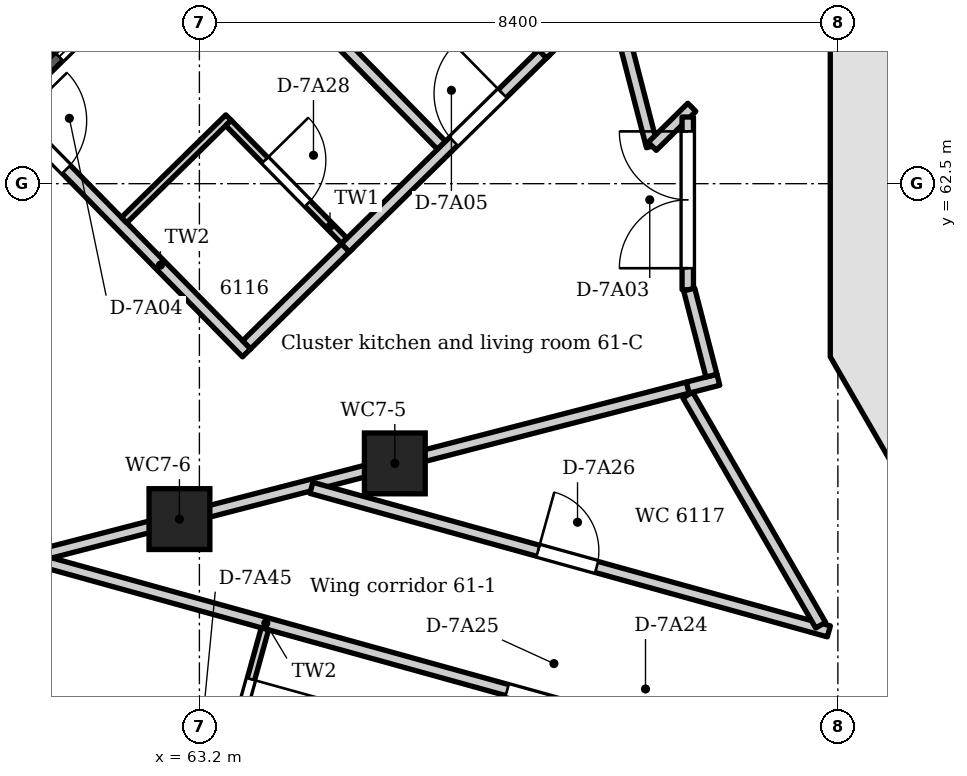
"""IFC4 building model, lengths in metres.
Left out: names, types, materials, properties, quantities, classifications, styles, units other than length and angle.
Written with IfcOpenShell. Run it as: python <this file> out.ifc"""

import sys

from ifc_helpers import new_model, si_unit, direction, frame, frame_2d, origin, origin_2d, place, context, subcontext, project, spatial, polyline, rectangle, circle, outline, extrude, element, fill, save


model = new_model("IFC4")
c1 = context("Model", 3, precision=1e-05, world=origin(), true_north=direction((0.0, 1.0)))
c2 = subcontext(c1, "Body", "Model", "MODEL_VIEW")
j1 = project(units=[si_unit("LENGTHUNIT", "METRE"), si_unit("PLANEANGLEUNIT", "RADIAN")], contexts=[c1])
p1 = place(None, origin())
s1 = spatial("IfcSite", under=j1, at=p1, CompositionType="ELEMENT")
p2 = place(p1, origin())
s2 = spatial("IfcBuilding", under=s1, at=p2, CompositionType="ELEMENT")
p3 = place(p2, frame((0.0, 0.0, 234.9)))
s3 = spatial("IfcBuildingStorey", under=s2, at=p3, CompositionType="ELEMENT", Elevation=234.9)
p4 = place(p3, frame((71.85, 64.778, 0.0), z_axis=(0.0, 0.0, 1.0), x_axis=(0.0, -1.0, 0.0)))
e1 = element("IfcWall", 1, at=p4, inside=s3, PredefinedType="SHEAR", context=c2, shape_type="SweptSolid", body=[
    extrude(outline(polyline([(0.0, -0.35), (4.555, -0.35), (4.368, 0.35), (0.188, 0.35), (0.0, -0.35)])), origin(), (0.0, 0.0, 1.0), 3.6),
])
p5 = place(p4, frame((2.992, 0.0, 0.0)))
e2 = element("IfcOpeningElement", 2, at=p5, cuts=e1, PredefinedType="OPENING", context=c2, shape_type="SweptSolid", body=[
    extrude(rectangle(XDim=0.9, YDim=2.1, at=frame_2d((0.45, 1.05))), frame((0.0, 0.36, 0.0), z_axis=(0.0, -1.0, 0.0), x_axis=(1.0, 0.0, 0.0)), (0.0, 0.0, 1.0), 0.72),
])
p6 = place(p3, frame((71.803, 60.397, 0.0), z_axis=(0.0, 0.0, 1.0), x_axis=(0.499983800959, -0.866034756103, 0.0)))
e3 = element("IfcWall", 3, at=p6, inside=s3, PredefinedType="SHEAR", context=c2, shape_type="SweptSolid", body=[
    extrude(outline(polyline([(0.0, -0.35), (4.555, -0.35), (4.368, 0.35), (0.188, 0.35), (0.0, -0.35)])), origin(), (0.0, 0.0, 1.0), 3.6),
])
p7 = place(p6, frame((1.577, 0.0, 0.0)))
e4 = element("IfcOpeningElement", 4, at=p7, cuts=e3, PredefinedType="OPENING", context=c2, shape_type="SweptSolid", body=[
    extrude(rectangle(XDim=1.4, YDim=2.1, at=frame_2d((0.7, 1.05))), frame((0.0, 0.36, 0.0), z_axis=(0.0, -1.0, 0.0), x_axis=(1.0, 0.0, 0.0)), (0.0, 0.0, 1.0), 0.72),
])
for number, where, z_axis, x_axis in (
    (5, (65.771, 58.82, -0.35), (0.0, 0.0, 1.0), (1.0, 0.0, 0.0)),
    (6, (62.938, 58.087, -0.35), (0.0, 0.0, 1.0), (1.0, 0.0, 0.0)),
):
    element("IfcColumn", number, at=place(p3, frame(where, z_axis=z_axis, x_axis=x_axis)), inside=s3, PredefinedType="COLUMN", context=c2, shape_type="SweptSolid", body=[
        extrude(circle(Radius=0.4, at=origin_2d()), origin(), (0.0, 0.0, 1.0), 3.95),
    ])
p8 = place(p3, frame((57.99, 60.867, 0.0), z_axis=(0.0, 0.0, 1.0), x_axis=(0.713254682671, 0.700904956216, 0.0)))
e7 = element("IfcWall", 7, at=p8, inside=s3, PredefinedType="SOLIDWALL", context=c2, shape_type="SweptSolid", body=[
    extrude(outline(polyline([(0.149, 0.075), (0.149, -0.075), (33.537, -0.075), (33.537, 0.075), (0.149, 0.075)])), origin(), (0.0, 0.0, 1.0), 3.3),
])
p9 = place(p8, frame((1.171, 0.0, 0.0)))
e8 = element("IfcOpeningElement", 8, at=p9, cuts=e7, PredefinedType="OPENING", context=c2, shape_type="SweptSolid", body=[
    extrude(rectangle(XDim=1.8, YDim=2.6, at=frame_2d((0.9, 1.3))), frame((0.0, 0.085, 0.0), z_axis=(0.0, -1.0, 0.0), x_axis=(1.0, 0.0, 0.0)), (0.0, 0.0, 1.0), 0.17),
])
p10 = place(p8, frame((4.714, 0.0, 0.0)))
e9 = element("IfcOpeningElement", 9, at=p10, cuts=e7, PredefinedType="OPENING", context=c2, shape_type="SweptSolid", body=[
    extrude(rectangle(XDim=1.8, YDim=2.6, at=frame_2d((0.9, 1.3))), frame((0.0, 0.085, 0.0), z_axis=(0.0, -1.0, 0.0), x_axis=(1.0, 0.0, 0.0)), (0.0, 0.0, 1.0), 0.17),
])
p11 = place(p8, frame((8.457, 0.0, 0.0)))
e10 = element("IfcOpeningElement", 10, at=p11, cuts=e7, PredefinedType="OPENING", context=c2, shape_type="SweptSolid", body=[
    extrude(rectangle(XDim=1.8, YDim=2.6, at=frame_2d((0.9, 1.3))), frame((0.0, 0.085, 0.0), z_axis=(0.0, -1.0, 0.0), x_axis=(1.0, 0.0, 0.0)), (0.0, 0.0, 1.0), 0.17),
])
p12 = place(p8, frame((12.2, 0.0, 0.0)))
e11 = element("IfcOpeningElement", 11, at=p12, cuts=e7, PredefinedType="OPENING", context=c2, shape_type="SweptSolid", body=[
    extrude(rectangle(XDim=1.8, YDim=2.6, at=frame_2d((0.9, 1.3))), frame((0.0, 0.085, 0.0), z_axis=(0.0, -1.0, 0.0), x_axis=(1.0, 0.0, 0.0)), (0.0, 0.0, 1.0), 0.17),
])
p13 = place(p8, frame((15.943, 0.0, 0.0)))
e12 = element("IfcOpeningElement", 12, at=p13, cuts=e7, PredefinedType="OPENING", context=c2, shape_type="SweptSolid", body=[
    extrude(rectangle(XDim=1.8, YDim=2.6, at=frame_2d((0.9, 1.3))), frame((0.0, 0.085, 0.0), z_axis=(0.0, -1.0, 0.0), x_axis=(1.0, 0.0, 0.0)), (0.0, 0.0, 1.0), 0.17),
])
p14 = place(p8, frame((19.686, 0.0, 0.0)))
e13 = element("IfcOpeningElement", 13, at=p14, cuts=e7, PredefinedType="OPENING", context=c2, shape_type="SweptSolid", body=[
    extrude(rectangle(XDim=1.8, YDim=2.6, at=frame_2d((0.9, 1.3))), frame((0.0, 0.085, 0.0), z_axis=(0.0, -1.0, 0.0), x_axis=(1.0, 0.0, 0.0)), (0.0, 0.0, 1.0), 0.17),
])
p15 = place(p8, frame((23.429, 0.0, 0.0)))
e14 = element("IfcOpeningElement", 14, at=p15, cuts=e7, PredefinedType="OPENING", context=c2, shape_type="SweptSolid", body=[
    extrude(rectangle(XDim=1.8, YDim=2.6, at=frame_2d((0.9, 1.3))), frame((0.0, 0.085, 0.0), z_axis=(0.0, -1.0, 0.0), x_axis=(1.0, 0.0, 0.0)), (0.0, 0.0, 1.0), 0.17),
])
p16 = place(p8, frame((27.172, 0.0, 0.0)))
e15 = element("IfcOpeningElement", 15, at=p16, cuts=e7, PredefinedType="OPENING", context=c2, shape_type="SweptSolid", body=[
    extrude(rectangle(XDim=1.8, YDim=2.6, at=frame_2d((0.9, 1.3))), frame((0.0, 0.085, 0.0), z_axis=(0.0, -1.0, 0.0), x_axis=(1.0, 0.0, 0.0)), (0.0, 0.0, 1.0), 0.17),
])
p17 = place(p8, frame((30.715, 0.0, 0.0)))
e16 = element("IfcOpeningElement", 16, at=p17, cuts=e7, PredefinedType="OPENING", context=c2, shape_type="SweptSolid", body=[
    extrude(rectangle(XDim=1.8, YDim=2.6, at=frame_2d((0.9, 1.3))), frame((0.0, 0.085, 0.0), z_axis=(0.0, -1.0, 0.0), x_axis=(1.0, 0.0, 0.0)), (0.0, 0.0, 1.0), 0.17),
])
p18 = place(p3, origin())
e17 = element("IfcWall", 17, at=p18, inside=s3, PredefinedType="PARAPET", context=c2, shape_type="SweptSolid", body=[
    extrude(outline(polyline([(80.313, 86.12), (49.243, 61.406), (49.565, 61.279), (78.266, 84.108), (80.313, 86.12)])), origin(), (0.0, 0.0, 1.0), 1.1),
])
p19 = place(p3, frame((60.712, 63.438, 0.0), z_axis=(0.0, 0.0, 1.0), x_axis=(0.700942148678, -0.713218132276, 0.0)))
e18 = element("IfcWall", 18, at=p19, inside=s3, PredefinedType="PARTITIONING", context=c2, shape_type="SweptSolid", body=[
    extrude(rectangle(XDim=4.435, YDim=0.15, at=frame_2d((2.218, 0.0))), origin(), (0.0, 0.0, 1.0), 3.3),
])
p20 = place(p19, frame((0.15, 0.0, 0.0)))
e19 = element("IfcOpeningElement", 19, at=p20, cuts=e18, PredefinedType="OPENING", context=c2, shape_type="SweptSolid", body=[
    extrude(rectangle(XDim=0.9, YDim=2.1, at=frame_2d((0.45, 1.05))), frame((0.0, 0.085, 0.0), z_axis=(0.0, -1.0, 0.0), x_axis=(1.0, 0.0, 0.0)), (0.0, 0.0, 1.0), 0.17),
])
p21 = place(p3, frame((60.898, 57.56, 0.0), z_axis=(0.0, 0.0, 1.0), x_axis=(0.968148722019, 0.250375821623, 0.0)))
e20 = element("IfcWall", 20, at=p21, inside=s3, PredefinedType="PARTITIONING", context=c2, shape_type="SweptSolid", body=[
    extrude(rectangle(XDim=9.018, YDim=0.15, at=frame_2d((4.509, 0.0))), origin(), (0.0, 0.0, 1.0), 2.75),
])
p22 = place(p3, frame((61.043, 57.559, 0.0), z_axis=(0.0, 0.0, 1.0), x_axis=(0.963630739332, -0.26723734435, 0.0)))
e21 = element("IfcWall", 21, at=p22, inside=s3, PredefinedType="PARTITIONING", context=c2, shape_type="SweptSolid", body=[
    extrude(rectangle(XDim=12.979, YDim=0.15, at=frame_2d((6.49, 0.0))), origin(), (0.0, 0.0, 1.0), 2.75),
])
p23 = place(p22, frame((7.74, 0.0, 0.0)))
e22 = element("IfcOpeningElement", 22, at=p23, cuts=e21, PredefinedType="OPENING", context=c2, shape_type="SweptSolid", body=[
    extrude(rectangle(XDim=0.9, YDim=2.1, at=frame_2d((0.45, 1.05))), frame((0.0, 0.085, 0.0), z_axis=(0.0, -1.0, 0.0), x_axis=(1.0, 0.0, 0.0)), (0.0, 0.0, 1.0), 0.17),
])
p24 = place(p22, frame((6.44, 0.0, 0.0)))
e23 = element("IfcOpeningElement", 23, at=p24, cuts=e21, PredefinedType="OPENING", context=c2, shape_type="SweptSolid", body=[
    extrude(rectangle(XDim=1.0, YDim=2.1, at=frame_2d((0.5, 1.05))), frame((0.0, 0.085, 0.0), z_axis=(0.0, -1.0, 0.0), x_axis=(1.0, 0.0, 0.0)), (0.0, 0.0, 1.0), 0.17),
])
p25 = place(p3, frame((62.209, 62.021, 0.0), z_axis=(0.0, 0.0, 1.0), x_axis=(0.713229664058, 0.70093041474, 0.0)))
e24 = element("IfcWall", 24, at=p25, inside=s3, PredefinedType="PARTITIONING", context=c2, shape_type="SweptSolid", body=[
    extrude(rectangle(XDim=1.926, YDim=0.1, at=frame_2d((0.963, 0.0))), origin(), (0.0, 0.0, 1.0), 3.3),
])
p26 = place(p3, frame((63.382, 66.061, 0.0), z_axis=(0.0, 0.0, 1.0), x_axis=(0.70092652961, -0.71323348217, 0.0)))
e25 = element("IfcWall", 25, at=p26, inside=s3, PredefinedType="PARTITIONING", context=c2, shape_type="SweptSolid", body=[
    extrude(rectangle(XDim=4.285, YDim=0.15, at=frame_2d((2.143, 0.0))), origin(), (0.0, 0.0, 1.0), 3.3),
])
p27 = place(p3, frame((63.427, 54.355, 0.0), z_axis=(0.0, 0.0, 1.0), x_axis=(0.267177255804, 0.963647401273, 0.0)))
e26 = element("IfcWall", 26, at=p27, inside=s3, PredefinedType="PARTITIONING", context=c2, shape_type="SweptSolid", body=[
    extrude(rectangle(XDim=2.375, YDim=0.1, at=frame_2d((1.188, 0.0))), origin(), (0.0, 0.0, 1.0), 3.3),
])
p28 = place(p27, frame((0.688, 0.0, 0.0)))
e27 = element("IfcOpeningElement", 27, at=p28, cuts=e26, PredefinedType="OPENING", context=c2, shape_type="SweptSolid", body=[
    extrude(rectangle(XDim=1.0, YDim=2.1, at=frame_2d((0.5, 1.05))), frame((0.0, 0.06, 0.0), z_axis=(0.0, -1.0, 0.0), x_axis=(1.0, 0.0, 0.0)), (0.0, 0.0, 1.0), 0.12),
])
p29 = place(p3, frame((63.582, 63.299, 0.0), z_axis=(0.0, 0.0, 1.0), x_axis=(0.700793702446, -0.713363993073, 0.0)))
e28 = element("IfcWall", 28, at=p29, inside=s3, PredefinedType="PARTITIONING", context=c2, shape_type="SweptSolid", body=[
    extrude(rectangle(XDim=2.175, YDim=0.1, at=frame_2d((1.088, 0.0))), origin(), (0.0, 0.0, 1.0), 3.3),
])
p30 = place(p29, frame((0.688, 0.0, 0.0)))
e29 = element("IfcOpeningElement", 29, at=p30, cuts=e28, PredefinedType="OPENING", context=c2, shape_type="SweptSolid", body=[
    extrude(rectangle(XDim=0.8, YDim=2.1, at=frame_2d((0.4, 1.05))), frame((0.0, 0.06, 0.0), z_axis=(0.0, -1.0, 0.0), x_axis=(1.0, 0.0, 0.0)), (0.0, 0.0, 1.0), 0.12),
])
p31 = place(p3, frame((63.822, 60.381, 0.0), z_axis=(0.0, 0.0, 1.0), x_axis=(0.713509638131, 0.700645414096, 0.0)))
e30 = element("IfcWall", 30, at=p31, inside=s3, PredefinedType="PARTITIONING", context=c2, shape_type="SweptSolid", body=[
    extrude(rectangle(XDim=1.879, YDim=0.15, at=frame_2d((0.939, 0.0))), origin(), (0.0, 0.0, 1.0), 3.3),
])
p32 = place(p3, frame((64.673, 58.498, 0.0), z_axis=(0.0, 0.0, 1.0), x_axis=(0.963632187737, -0.267232121491, 0.0)))
e31 = element("IfcWall", 31, at=p32, inside=s3, PredefinedType="PARTITIONING", context=c2, shape_type="SweptSolid", body=[
    extrude(rectangle(XDim=7.065, YDim=0.15, at=frame_2d((3.532, 0.0))), origin(), (0.0, 0.0, 1.0), 2.8),
])
p33 = place(p32, frame((3.095, 0.0, 0.0)))
e32 = element("IfcOpeningElement", 32, at=p33, cuts=e31, PredefinedType="OPENING", context=c2, shape_type="SweptSolid", body=[
    extrude(rectangle(XDim=0.8, YDim=2.1, at=frame_2d((0.4, 1.05))), frame((0.0, 0.085, 0.0), z_axis=(0.0, -1.0, 0.0), x_axis=(1.0, 0.0, 0.0)), (0.0, 0.0, 1.0), 0.17),
])
p34 = place(p3, frame((65.12, 61.656, 0.0), z_axis=(0.0, 0.0, 1.0), x_axis=(0.713194386998, 0.700966309001, 0.0)))
e33 = element("IfcWall", 33, at=p34, inside=s3, PredefinedType="PARTITIONING", context=c2, shape_type="SweptSolid", body=[
    extrude(rectangle(XDim=3.694, YDim=0.15, at=frame_2d((1.847, 0.0))), origin(), (0.0, 0.0, 1.0), 3.3),
])
p35 = place(p34, frame((1.998, 0.0, 0.0)))
e34 = element("IfcOpeningElement", 34, at=p35, cuts=e33, PredefinedType="OPENING", context=c2, shape_type="SweptSolid", body=[
    extrude(rectangle(XDim=0.9, YDim=2.1, at=frame_2d((0.45, 1.05))), frame((0.0, 0.085, 0.0), z_axis=(0.0, -1.0, 0.0), x_axis=(1.0, 0.0, 0.0)), (0.0, 0.0, 1.0), 0.17),
])
p36 = place(p3, frame((66.139, 65.812, 0.0), z_axis=(0.0, 0.0, 1.0), x_axis=(0.701018173636, -0.713143407901, 0.0)))
e35 = element("IfcWall", 35, at=p36, inside=s3, PredefinedType="PARTITIONING", context=c2, shape_type="SweptSolid", body=[
    extrude(rectangle(XDim=2.175, YDim=0.1, at=frame_2d((1.087, 0.0))), origin(), (0.0, 0.0, 1.0), 3.3),
])
p37 = place(p36, frame((0.687, 0.0, 0.0)))
e36 = element("IfcOpeningElement", 36, at=p37, cuts=e35, PredefinedType="OPENING", context=c2, shape_type="SweptSolid", body=[
    extrude(rectangle(XDim=0.8, YDim=2.1, at=frame_2d((0.4, 1.05))), frame((0.0, 0.06, 0.0), z_axis=(0.0, -1.0, 0.0), x_axis=(1.0, 0.0, 0.0)), (0.0, 0.0, 1.0), 0.12),
])
p38 = place(p3, frame((67.714, 64.205, 0.0), z_axis=(0.0, 0.0, 1.0), x_axis=(0.712981774693, 0.70118256464, 0.0)))
e37 = element("IfcWall", 37, at=p38, inside=s3, PredefinedType="PARTITIONING", context=c2, shape_type="SweptSolid", body=[
    extrude(rectangle(XDim=1.262, YDim=0.15, at=frame_2d((0.631, 0.0))), origin(), (0.0, 0.0, 1.0), 3.3),
])
p39 = place(p3, frame((68.631, 65.016, 0.0), z_axis=(0.0, 0.0, 1.0), x_axis=(0.250220542644, -0.968188865893, 0.0)))
e38 = element("IfcWall", 38, at=p39, inside=s3, PredefinedType="PARTITIONING", context=c2, shape_type="SweptSolid", body=[
    extrude(rectangle(XDim=2.091, YDim=0.15, at=frame_2d((1.045, 0.0))), origin(), (0.0, 0.0, 1.0), 3.3),
])
p40 = place(p3, frame((69.158, 62.992, 0.0), z_axis=(0.0, 0.0, 1.0), x_axis=(0.712433157826, 0.701739977221, 0.0)))
e39 = element("IfcWall", 39, at=p40, inside=s3, PredefinedType="PARTITIONING", context=c2, shape_type="SweptSolid", body=[
    extrude(rectangle(XDim=0.731, YDim=0.15, at=frame_2d((0.365, 0.0))), origin(), (0.0, 0.0, 1.0), 3.3),
])
p41 = place(p3, frame((69.625, 59.72, 0.0), z_axis=(0.0, 0.0, 1.0), x_axis=(0.50005889006, -0.865991400923, 0.0)))
e40 = element("IfcWall", 40, at=p41, inside=s3, PredefinedType="PARTITIONING", context=c2, shape_type="SweptSolid", body=[
    extrude(rectangle(XDim=3.497, YDim=0.15, at=frame_2d((1.748, 0.0))), origin(), (0.0, 0.0, 1.0), 2.8),
])
p42 = place(p3, frame((69.625, 59.817, 0.0), z_axis=(0.0, 0.0, 1.0), x_axis=(0.968355193071, 0.249576080688, 0.0)))
e41 = element("IfcWall", 41, at=p42, inside=s3, PredefinedType="PARTITIONING", context=c2, shape_type="SweptSolid", body=[
    extrude(rectangle(XDim=0.416, YDim=0.15, at=frame_2d((0.208, 0.0))), origin(), (0.0, 0.0, 1.0), 2.8),
])
p43 = place(p3, frame((69.625, 61.105, 0.0), z_axis=(0.0, 0.0, 1.0), x_axis=(0.0, 1.0, 0.0)))
e42 = element("IfcWall", 42, at=p43, inside=s3, PredefinedType="PARTITIONING", context=c2, shape_type="SweptSolid", body=[
    extrude(rectangle(XDim=2.272, YDim=0.15, at=frame_2d((1.136, 0.0))), origin(), (0.0, 0.0, 1.0), 3.3),
])
p44 = place(p43, frame((0.283, 0.0, 0.0)))
e43 = element("IfcOpeningElement", 43, at=p44, cuts=e42, PredefinedType="OPENING", context=c2, shape_type="SweptSolid", body=[
    extrude(rectangle(XDim=1.8, YDim=2.1, at=frame_2d((0.9, 1.05))), frame((0.0, 0.085, 0.0), z_axis=(0.0, -1.0, 0.0), x_axis=(1.0, 0.0, 0.0)), (0.0, 0.0, 1.0), 0.17),
])
p45 = place(p3, frame((69.644, 61.107, 0.0), z_axis=(0.0, 0.0, 1.0), x_axis=(0.249991617467, -0.968248000874, 0.0)))
e44 = element("IfcWall", 44, at=p45, inside=s3, PredefinedType="PARTITIONING", context=c2, shape_type="SweptSolid", body=[
    extrude(rectangle(XDim=1.17, YDim=0.15, at=frame_2d((0.585, 0.0))), origin(), (0.0, 0.0, 1.0), 2.8),
])
p46 = place(p10, origin())
e45 = element("IfcDoor", 45, at=p46, inside=s3, OperationType="SLIDING_TO_LEFT", PredefinedType="DOOR", context=c2, shape_type="SweptSolid", body=[
    extrude(rectangle(XDim=1.8, YDim=2.6, at=frame_2d((0.9, 1.3))), frame((0.0, 0.025, 0.0), z_axis=(0.0, -1.0, 0.0), x_axis=(1.0, 0.0, 0.0)), (0.0, 0.0, 1.0), 0.05),
])
fill(e9, e45)
p47 = place(p44, origin())
e46 = element("IfcDoor", 46, at=p47, inside=s3, OperationType="DOUBLE_DOOR_DOUBLE_SWING", PredefinedType="DOOR", context=c2, shape_type="SweptSolid", body=[
    extrude(rectangle(XDim=1.8, YDim=2.1, at=frame_2d((0.9, 1.05))), frame((0.0, 0.025, 0.0), z_axis=(0.0, -1.0, 0.0), x_axis=(1.0, 0.0, 0.0)), (0.0, 0.0, 1.0), 0.05),
])
fill(e43, e46)
p48 = place(p20, origin())
e47 = element("IfcDoor", 47, at=p48, inside=s3, OperationType="SINGLE_SWING_LEFT", PredefinedType="DOOR", context=c2, shape_type="SweptSolid", body=[
    extrude(rectangle(XDim=0.9, YDim=2.1, at=frame_2d((0.45, 1.05))), frame((0.0, 0.025, 0.0), z_axis=(0.0, -1.0, 0.0), x_axis=(1.0, 0.0, 0.0)), (0.0, 0.0, 1.0), 0.05),
])
fill(e19, e47)
p49 = place(p35, origin())
e48 = element("IfcDoor", 48, at=p49, inside=s3, OperationType="SINGLE_SWING_RIGHT", PredefinedType="DOOR", context=c2, shape_type="SweptSolid", body=[
    extrude(rectangle(XDim=0.9, YDim=2.1, at=frame_2d((0.45, 1.05))), frame((0.0, 0.025, 0.0), z_axis=(0.0, -1.0, 0.0), x_axis=(1.0, 0.0, 0.0)), (0.0, 0.0, 1.0), 0.05),
])
fill(e34, e48)
p50 = place(p24, frame((1.0, 0.0, 0.0), z_axis=(0.0, 0.0, 1.0), x_axis=(-1.0, 0.0, 0.0)))
e49 = element("IfcDoor", 49, at=p50, inside=s3, OperationType="SINGLE_SWING_LEFT", PredefinedType="DOOR", context=c2, shape_type="SweptSolid", body=[
    extrude(rectangle(XDim=1.0, YDim=2.1, at=frame_2d((0.5, 1.05))), frame((0.0, 0.025, 0.0), z_axis=(0.0, -1.0, 0.0), x_axis=(1.0, 0.0, 0.0)), (0.0, 0.0, 1.0), 0.05),
])
fill(e23, e49)
p51 = place(p33, origin())
e50 = element("IfcDoor", 50, at=p51, inside=s3, OperationType="SINGLE_SWING_LEFT", PredefinedType="DOOR", context=c2, shape_type="SweptSolid", body=[
    extrude(rectangle(XDim=0.8, YDim=2.1, at=frame_2d((0.4, 1.05))), frame((0.0, 0.025, 0.0), z_axis=(0.0, -1.0, 0.0), x_axis=(1.0, 0.0, 0.0)), (0.0, 0.0, 1.0), 0.05),
])
fill(e32, e50)
p52 = place(p30, origin())
e51 = element("IfcDoor", 51, at=p52, inside=s3, OperationType="SINGLE_SWING_LEFT", PredefinedType="DOOR", context=c2, shape_type="SweptSolid", body=[
    extrude(rectangle(XDim=0.8, YDim=2.1, at=frame_2d((0.4, 1.05))), frame((0.0, 0.025, 0.0), z_axis=(0.0, -1.0, 0.0), x_axis=(1.0, 0.0, 0.0)), (0.0, 0.0, 1.0), 0.05),
])
fill(e29, e51)
p53 = place(p28, frame((1.0, 0.0, 0.0), z_axis=(0.0, 0.0, 1.0), x_axis=(-1.0, 0.0, 0.0)))
e52 = element("IfcDoor", 52, at=p53, inside=s3, OperationType="SINGLE_SWING_LEFT", PredefinedType="DOOR", context=c2, shape_type="SweptSolid", body=[
    extrude(rectangle(XDim=1.0, YDim=2.1, at=frame_2d((0.5, 1.05))), frame((0.0, 0.025, 0.0), z_axis=(0.0, -1.0, 0.0), x_axis=(1.0, 0.0, 0.0)), (0.0, 0.0, 1.0), 0.05),
])
fill(e27, e52)
p54 = place(p5, origin())
e53 = element("IfcDoor", 53, at=p54, inside=s3, OperationType="SINGLE_SWING_RIGHT", PredefinedType="DOOR", context=c2, shape_type="SweptSolid", body=[
    extrude(rectangle(XDim=0.9, YDim=2.1, at=frame_2d((0.45, 1.05))), frame((0.0, 0.075, 0.0), z_axis=(0.0, -1.0, 0.0), x_axis=(1.0, 0.0, 0.0)), (0.0, 0.0, 1.0), 0.05),
])
fill(e2, e53)
save(model, sys.argv[1])
